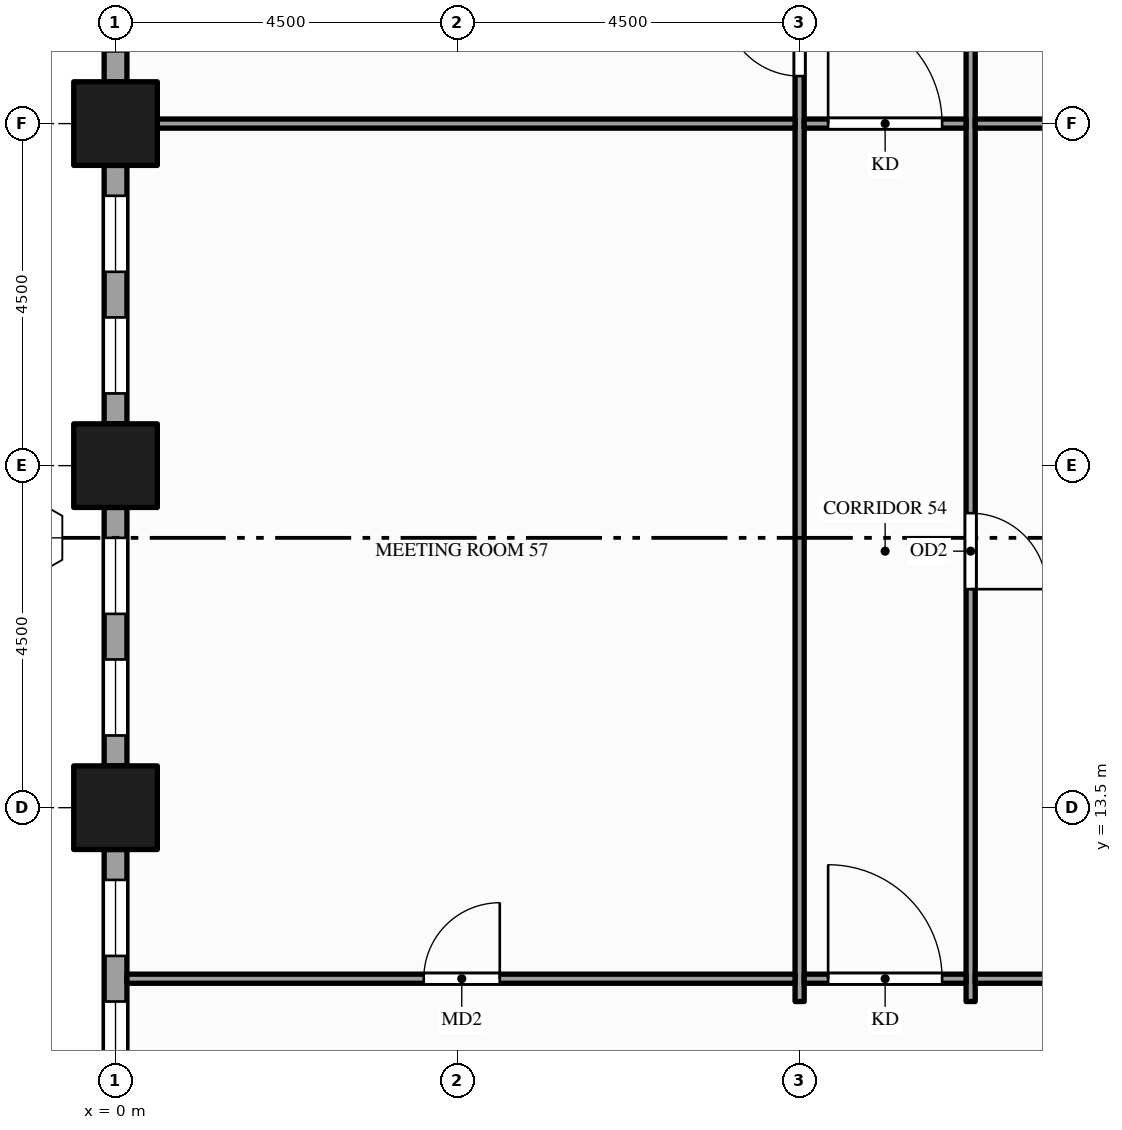
"""IFC4 building model, lengths in metres.
Left out: names, types, materials, properties, quantities, classifications, styles, units other than length and angle.
Written with IfcOpenShell. Run it as: python <this file> out.ifc"""

import sys

from ifc_helpers import new_model, si_unit, direction, frame, frame_2d, origin, origin_2d, place, context, subcontext, project, spatial, rectangle, hollow_rectangle, extrude, element, fill, save


model = new_model("IFC4")
c1 = context("Model", 3, precision=1e-05, world=origin(), true_north=direction((0.0, 1.0)))
c2 = subcontext(c1, "Body", "Model", "MODEL_VIEW")
j1 = project(units=[si_unit("LENGTHUNIT", "METRE"), si_unit("PLANEANGLEUNIT", "RADIAN")], contexts=[c1])
p1 = place(None, origin())
s1 = spatial("IfcSite", under=j1, at=p1, CompositionType="ELEMENT")
p2 = place(p1, origin())
s2 = spatial("IfcBuilding", under=s1, at=p2, CompositionType="ELEMENT")
p3 = place(p2, frame((0.0, 0.0, 14.0)))
s3 = spatial("IfcBuildingStorey", under=s2, at=p3, CompositionType="ELEMENT", Elevation=14.0)
for number, where, z_axis, x_axis in (
    (1, (0.0, 13.5, -0.25), (0.0, 0.0, 1.0), (1.0, 0.0, 0.0)),
    (2, (0.0, 18.0, -0.25), (0.0, 0.0, 1.0), (1.0, 0.0, 0.0)),
    (3, (0.0, 22.5, -0.25), (0.0, 0.0, 1.0), (1.0, 0.0, 0.0)),
):
    element("IfcColumn", number, at=place(p3, frame(where, z_axis=z_axis, x_axis=x_axis)), inside=s3, PredefinedType="COLUMN", context=c2, shape_type="SweptSolid", body=[
        extrude(hollow_rectangle(XDim=1.1, YDim=1.1, WallThickness=0.06, at=origin_2d()), origin(), (0.0, 0.0, 1.0), 5.0),
    ])
p4 = place(p3, frame((0.0, 26.45, 0.0), z_axis=(0.0, 0.0, 1.0), x_axis=(0.0, -1.0, 0.0)))
e4 = element("IfcWall", 4, at=p4, inside=s3, PredefinedType="STANDARD", context=c2, shape_type="SweptSolid", body=[
    extrude(rectangle(XDim=3.4, YDim=0.3, at=frame_2d((1.7, 0.0))), origin(), (0.0, 0.0, 1.0), 4.036),
])
p5 = place(p4, frame((0.4, 0.0, 0.9)))
e5 = element("IfcOpeningElement", 5, at=p5, cuts=e4, PredefinedType="OPENING", context=c2, shape_type="SweptSolid", body=[
    extrude(rectangle(XDim=1.0, YDim=2.75, at=frame_2d((0.5, 1.375))), frame((0.0, 0.16, 0.0), z_axis=(0.0, -1.0, 0.0), x_axis=(1.0, 0.0, 0.0)), (0.0, 0.0, 1.0), 0.32),
])
p6 = place(p4, frame((2.0, 0.0, 0.9)))
e6 = element("IfcOpeningElement", 6, at=p6, cuts=e4, PredefinedType="OPENING", context=c2, shape_type="SweptSolid", body=[
    extrude(rectangle(XDim=1.0, YDim=2.75, at=frame_2d((0.5, 1.375))), frame((0.0, 0.16, 0.0), z_axis=(0.0, -1.0, 0.0), x_axis=(1.0, 0.0, 0.0)), (0.0, 0.0, 1.0), 0.32),
])
p7 = place(p3, frame((0.0, 21.95, 0.0), z_axis=(0.0, 0.0, 1.0), x_axis=(0.0, -1.0, 0.0)))
e7 = element("IfcWall", 7, at=p7, inside=s3, PredefinedType="STANDARD", context=c2, shape_type="SweptSolid", body=[
    extrude(rectangle(XDim=3.4, YDim=0.3, at=frame_2d((1.7, 0.0))), origin(), (0.0, 0.0, 1.0), 4.036),
])
p8 = place(p7, frame((0.4, 0.0, 0.9)))
e8 = element("IfcOpeningElement", 8, at=p8, cuts=e7, PredefinedType="OPENING", context=c2, shape_type="SweptSolid", body=[
    extrude(rectangle(XDim=1.0, YDim=2.75, at=frame_2d((0.5, 1.375))), frame((0.0, 0.16, 0.0), z_axis=(0.0, -1.0, 0.0), x_axis=(1.0, 0.0, 0.0)), (0.0, 0.0, 1.0), 0.32),
])
p9 = place(p7, frame((2.0, 0.0, 0.9)))
e9 = element("IfcOpeningElement", 9, at=p9, cuts=e7, PredefinedType="OPENING", context=c2, shape_type="SweptSolid", body=[
    extrude(rectangle(XDim=1.0, YDim=2.75, at=frame_2d((0.5, 1.375))), frame((0.0, 0.16, 0.0), z_axis=(0.0, -1.0, 0.0), x_axis=(1.0, 0.0, 0.0)), (0.0, 0.0, 1.0), 0.32),
])
p10 = place(p3, frame((0.0, 17.45, 0.0), z_axis=(0.0, 0.0, 1.0), x_axis=(0.0, -1.0, 0.0)))
e10 = element("IfcWall", 10, at=p10, inside=s3, PredefinedType="STANDARD", context=c2, shape_type="SweptSolid", body=[
    extrude(rectangle(XDim=3.4, YDim=0.3, at=frame_2d((1.7, 0.0))), origin(), (0.0, 0.0, 1.0), 4.036),
])
p11 = place(p10, frame((0.4, 0.0, 0.9)))
e11 = element("IfcOpeningElement", 11, at=p11, cuts=e10, PredefinedType="OPENING", context=c2, shape_type="SweptSolid", body=[
    extrude(rectangle(XDim=1.0, YDim=2.75, at=frame_2d((0.5, 1.375))), frame((0.0, 0.16, 0.0), z_axis=(0.0, -1.0, 0.0), x_axis=(1.0, 0.0, 0.0)), (0.0, 0.0, 1.0), 0.32),
])
p12 = place(p10, frame((2.0, 0.0, 0.9)))
e12 = element("IfcOpeningElement", 12, at=p12, cuts=e10, PredefinedType="OPENING", context=c2, shape_type="SweptSolid", body=[
    extrude(rectangle(XDim=1.0, YDim=2.75, at=frame_2d((0.5, 1.375))), frame((0.0, 0.16, 0.0), z_axis=(0.0, -1.0, 0.0), x_axis=(1.0, 0.0, 0.0)), (0.0, 0.0, 1.0), 0.32),
])
p13 = place(p3, frame((0.0, 12.95, 0.0), z_axis=(0.0, 0.0, 1.0), x_axis=(0.0, -1.0, 0.0)))
e13 = element("IfcWall", 13, at=p13, inside=s3, PredefinedType="STANDARD", context=c2, shape_type="SweptSolid", body=[
    extrude(rectangle(XDim=3.4, YDim=0.3, at=frame_2d((1.7, 0.0))), origin(), (0.0, 0.0, 1.0), 4.036),
])
p14 = place(p13, frame((0.4, 0.0, 0.9)))
e14 = element("IfcOpeningElement", 14, at=p14, cuts=e13, PredefinedType="OPENING", context=c2, shape_type="SweptSolid", body=[
    extrude(rectangle(XDim=1.0, YDim=2.75, at=frame_2d((0.5, 1.375))), frame((0.0, 0.16, 0.0), z_axis=(0.0, -1.0, 0.0), x_axis=(1.0, 0.0, 0.0)), (0.0, 0.0, 1.0), 0.32),
])
p15 = place(p13, frame((2.0, 0.0, 0.9)))
e15 = element("IfcOpeningElement", 15, at=p15, cuts=e13, PredefinedType="OPENING", context=c2, shape_type="SweptSolid", body=[
    extrude(rectangle(XDim=1.0, YDim=2.75, at=frame_2d((0.5, 1.375))), frame((0.0, 0.16, 0.0), z_axis=(0.0, -1.0, 0.0), x_axis=(1.0, 0.0, 0.0)), (0.0, 0.0, 1.0), 0.32),
])
p16 = place(p3, frame((9.0, 10.95, 0.0), z_axis=(0.0, 0.0, 1.0), x_axis=(0.0, 1.0, 0.0)))
e16 = element("IfcWall", 16, at=p16, inside=s3, PredefinedType="PARTITIONING", context=c2, shape_type="SweptSolid", body=[
    extrude(rectangle(XDim=20.85, YDim=0.12, at=frame_2d((10.425, 0.0))), origin(), (0.0, 0.0, 1.0), 3.5),
])
p17 = place(p16, frame((12.175, 0.0, 0.0)))
e17 = element("IfcOpeningElement", 17, at=p17, cuts=e16, PredefinedType="OPENING", context=c2, shape_type="SweptSolid", body=[
    extrude(rectangle(XDim=1.0, YDim=2.1, at=frame_2d((0.5, 1.05))), frame((0.0, 0.07, 0.0), z_axis=(0.0, -1.0, 0.0), x_axis=(1.0, 0.0, 0.0)), (0.0, 0.0, 1.0), 0.14),
])
p18 = place(p16, frame((14.425, 0.0, 0.0)))
e18 = element("IfcOpeningElement", 18, at=p18, cuts=e16, PredefinedType="OPENING", context=c2, shape_type="SweptSolid", body=[
    extrude(rectangle(XDim=1.0, YDim=2.1, at=frame_2d((0.5, 1.05))), frame((0.0, 0.07, 0.0), z_axis=(0.0, -1.0, 0.0), x_axis=(1.0, 0.0, 0.0)), (0.0, 0.0, 1.0), 0.14),
])
p19 = place(p16, frame((16.675, 0.0, 0.0)))
e19 = element("IfcOpeningElement", 19, at=p19, cuts=e16, PredefinedType="OPENING", context=c2, shape_type="SweptSolid", body=[
    extrude(rectangle(XDim=1.0, YDim=2.1, at=frame_2d((0.5, 1.05))), frame((0.0, 0.07, 0.0), z_axis=(0.0, -1.0, 0.0), x_axis=(1.0, 0.0, 0.0)), (0.0, 0.0, 1.0), 0.14),
])
p20 = place(p16, frame((18.925, 0.0, 0.0)))
e20 = element("IfcOpeningElement", 20, at=p20, cuts=e16, PredefinedType="OPENING", context=c2, shape_type="SweptSolid", body=[
    extrude(rectangle(XDim=1.0, YDim=2.1, at=frame_2d((0.5, 1.05))), frame((0.0, 0.07, 0.0), z_axis=(0.0, -1.0, 0.0), x_axis=(1.0, 0.0, 0.0)), (0.0, 0.0, 1.0), 0.14),
])
p21 = place(p3, frame((11.25, 10.95, 0.0), z_axis=(0.0, 0.0, 1.0), x_axis=(0.0, 1.0, 0.0)))
e21 = element("IfcWall", 21, at=p21, inside=s3, PredefinedType="PARTITIONING", context=c2, shape_type="SweptSolid", body=[
    extrude(rectangle(XDim=20.85, YDim=0.12, at=frame_2d((10.425, 0.0))), origin(), (0.0, 0.0, 1.0), 3.5),
])
p22 = place(p21, frame((5.425, 0.0, 0.0)))
e22 = element("IfcOpeningElement", 22, at=p22, cuts=e21, PredefinedType="OPENING", context=c2, shape_type="SweptSolid", body=[
    extrude(rectangle(XDim=1.0, YDim=2.1, at=frame_2d((0.5, 1.05))), frame((0.0, 0.07, 0.0), z_axis=(0.0, -1.0, 0.0), x_axis=(1.0, 0.0, 0.0)), (0.0, 0.0, 1.0), 0.14),
])
p23 = place(p21, frame((14.425, 0.0, 0.0)))
e23 = element("IfcOpeningElement", 23, at=p23, cuts=e21, PredefinedType="OPENING", context=c2, shape_type="SweptSolid", body=[
    extrude(rectangle(XDim=1.0, YDim=2.1, at=frame_2d((0.5, 1.05))), frame((0.0, 0.07, 0.0), z_axis=(0.0, -1.0, 0.0), x_axis=(1.0, 0.0, 0.0)), (0.0, 0.0, 1.0), 0.14),
])
p24 = place(p21, frame((18.925, 0.0, 0.0)))
e24 = element("IfcOpeningElement", 24, at=p24, cuts=e21, PredefinedType="OPENING", context=c2, shape_type="SweptSolid", body=[
    extrude(rectangle(XDim=1.0, YDim=2.1, at=frame_2d((0.5, 1.05))), frame((0.0, 0.07, 0.0), z_axis=(0.0, -1.0, 0.0), x_axis=(1.0, 0.0, 0.0)), (0.0, 0.0, 1.0), 0.14),
])
p25 = place(p3, frame((0.15, 11.25, 0.0), z_axis=(0.0, 0.0, 1.0), x_axis=(1.0, 0.0, 0.0)))
e25 = element("IfcWall", 25, at=p25, inside=s3, PredefinedType="PARTITIONING", context=c2, shape_type="SweptSolid", body=[
    extrude(rectangle(XDim=8.79, YDim=0.12, at=frame_2d((4.395, 0.0))), origin(), (0.0, 0.0, 1.0), 3.759),
])
p26 = place(p25, frame((3.905, 0.0, 0.0)))
e26 = element("IfcOpeningElement", 26, at=p26, cuts=e25, PredefinedType="OPENING", context=c2, shape_type="SweptSolid", body=[
    extrude(rectangle(XDim=1.0, YDim=2.1, at=frame_2d((0.5, 1.05))), frame((0.0, 0.07, 0.0), z_axis=(0.0, -1.0, 0.0), x_axis=(1.0, 0.0, 0.0)), (0.0, 0.0, 1.0), 0.14),
])
p27 = place(p3, frame((9.06, 11.25, 0.0), z_axis=(0.0, 0.0, 1.0), x_axis=(1.0, 0.0, 0.0)))
e27 = element("IfcWall", 27, at=p27, inside=s3, PredefinedType="PARTITIONING", context=c2, shape_type="SweptSolid", body=[
    extrude(rectangle(XDim=2.13, YDim=0.12, at=frame_2d((1.065, 0.0))), origin(), (0.0, 0.0, 1.0), 3.759),
])
p28 = place(p27, frame((0.315, 0.0, 0.0)))
e28 = element("IfcOpeningElement", 28, at=p28, cuts=e27, PredefinedType="OPENING", context=c2, shape_type="SweptSolid", body=[
    extrude(rectangle(XDim=1.5, YDim=2.1, at=frame_2d((0.75, 1.05))), frame((0.0, 0.07, 0.0), z_axis=(0.0, -1.0, 0.0), x_axis=(1.0, 0.0, 0.0)), (0.0, 0.0, 1.0), 0.14),
])
p29 = place(p3, frame((11.31, 11.25, 0.0), z_axis=(0.0, 0.0, 1.0), x_axis=(1.0, 0.0, 0.0)))
e29 = element("IfcWall", 29, at=p29, inside=s3, PredefinedType="PARTITIONING", context=c2, shape_type="SweptSolid", body=[
    extrude(rectangle(XDim=11.13, YDim=0.12, at=frame_2d((5.565, 0.0))), origin(), (0.0, 0.0, 1.0), 3.759),
])
p30 = place(p3, frame((0.15, 22.5, 0.0), z_axis=(0.0, 0.0, 1.0), x_axis=(1.0, 0.0, 0.0)))
e30 = element("IfcWall", 30, at=p30, inside=s3, PredefinedType="PARTITIONING", context=c2, shape_type="SweptSolid", body=[
    extrude(rectangle(XDim=8.79, YDim=0.12, at=frame_2d((4.395, 0.0))), origin(), (0.0, 0.0, 1.0), 3.5),
])
p31 = place(p3, frame((9.06, 22.5, 0.0), z_axis=(0.0, 0.0, 1.0), x_axis=(1.0, 0.0, 0.0)))
e31 = element("IfcWall", 31, at=p31, inside=s3, PredefinedType="PARTITIONING", context=c2, shape_type="SweptSolid", body=[
    extrude(rectangle(XDim=2.13, YDim=0.12, at=frame_2d((1.065, 0.0))), origin(), (0.0, 0.0, 1.0), 3.5),
])
p32 = place(p31, frame((0.315, 0.0, 0.0)))
e32 = element("IfcOpeningElement", 32, at=p32, cuts=e31, PredefinedType="OPENING", context=c2, shape_type="SweptSolid", body=[
    extrude(rectangle(XDim=1.5, YDim=2.1, at=frame_2d((0.75, 1.05))), frame((0.0, 0.07, 0.0), z_axis=(0.0, -1.0, 0.0), x_axis=(1.0, 0.0, 0.0)), (0.0, 0.0, 1.0), 0.14),
])
p33 = place(p3, frame((11.31, 22.5, 0.0), z_axis=(0.0, 0.0, 1.0), x_axis=(1.0, 0.0, 0.0)))
e33 = element("IfcWall", 33, at=p33, inside=s3, PredefinedType="PARTITIONING", context=c2, shape_type="SweptSolid", body=[
    extrude(rectangle(XDim=11.13, YDim=0.12, at=frame_2d((5.565, 0.0))), origin(), (0.0, 0.0, 1.0), 3.5),
])
p34 = place(p8, origin())
e34 = element("IfcWindow", 34, at=p34, inside=s3, PartitioningType="SINGLE_PANEL", PredefinedType="WINDOW", context=c2, shape_type="SweptSolid", body=[
    extrude(rectangle(XDim=1.0, YDim=2.75, at=frame_2d((0.5, 1.375))), frame((0.0, 0.03, 0.0), z_axis=(0.0, -1.0, 0.0), x_axis=(1.0, 0.0, 0.0)), (0.0, 0.0, 1.0), 0.06),
])
fill(e8, e34)
p35 = place(p9, origin())
e35 = element("IfcWindow", 35, at=p35, inside=s3, PartitioningType="SINGLE_PANEL", PredefinedType="WINDOW", context=c2, shape_type="SweptSolid", body=[
    extrude(rectangle(XDim=1.0, YDim=2.75, at=frame_2d((0.5, 1.375))), frame((0.0, 0.03, 0.0), z_axis=(0.0, -1.0, 0.0), x_axis=(1.0, 0.0, 0.0)), (0.0, 0.0, 1.0), 0.06),
])
fill(e9, e35)
p36 = place(p11, origin())
e36 = element("IfcWindow", 36, at=p36, inside=s3, PartitioningType="SINGLE_PANEL", PredefinedType="WINDOW", context=c2, shape_type="SweptSolid", body=[
    extrude(rectangle(XDim=1.0, YDim=2.75, at=frame_2d((0.5, 1.375))), frame((0.0, 0.03, 0.0), z_axis=(0.0, -1.0, 0.0), x_axis=(1.0, 0.0, 0.0)), (0.0, 0.0, 1.0), 0.06),
])
fill(e11, e36)
p37 = place(p12, origin())
e37 = element("IfcWindow", 37, at=p37, inside=s3, PartitioningType="SINGLE_PANEL", PredefinedType="WINDOW", context=c2, shape_type="SweptSolid", body=[
    extrude(rectangle(XDim=1.0, YDim=2.75, at=frame_2d((0.5, 1.375))), frame((0.0, 0.03, 0.0), z_axis=(0.0, -1.0, 0.0), x_axis=(1.0, 0.0, 0.0)), (0.0, 0.0, 1.0), 0.06),
])
fill(e12, e37)
p38 = place(p14, origin())
e38 = element("IfcWindow", 38, at=p38, inside=s3, PartitioningType="SINGLE_PANEL", PredefinedType="WINDOW", context=c2, shape_type="SweptSolid", body=[
    extrude(rectangle(XDim=1.0, YDim=2.75, at=frame_2d((0.5, 1.375))), frame((0.0, 0.03, 0.0), z_axis=(0.0, -1.0, 0.0), x_axis=(1.0, 0.0, 0.0)), (0.0, 0.0, 1.0), 0.06),
])
fill(e14, e38)
p39 = place(p15, origin())
e39 = element("IfcWindow", 39, at=p39, inside=s3, PartitioningType="SINGLE_PANEL", PredefinedType="WINDOW", context=c2, shape_type="SweptSolid", body=[
    extrude(rectangle(XDim=1.0, YDim=2.75, at=frame_2d((0.5, 1.375))), frame((0.0, 0.03, 0.0), z_axis=(0.0, -1.0, 0.0), x_axis=(1.0, 0.0, 0.0)), (0.0, 0.0, 1.0), 0.06),
])
fill(e15, e39)
p40 = place(p28, origin())
e40 = element("IfcDoor", 40, at=p40, inside=s3, OperationType="SINGLE_SWING_LEFT", PredefinedType="DOOR", context=c2, shape_type="SweptSolid", body=[
    extrude(rectangle(XDim=1.5, YDim=2.1, at=frame_2d((0.75, 1.05))), frame((0.0, 0.025, 0.0), z_axis=(0.0, -1.0, 0.0), x_axis=(1.0, 0.0, 0.0)), (0.0, 0.0, 1.0), 0.05),
])
fill(e28, e40)
p41 = place(p26, origin())
e41 = element("IfcDoor", 41, at=p41, inside=s3, OperationType="SINGLE_SWING_RIGHT", PredefinedType="DOOR", context=c2, shape_type="SweptSolid", body=[
    extrude(rectangle(XDim=1.0, YDim=2.1, at=frame_2d((0.5, 1.05))), frame((0.0, 0.025, 0.0), z_axis=(0.0, -1.0, 0.0), x_axis=(1.0, 0.0, 0.0)), (0.0, 0.0, 1.0), 0.05),
])
fill(e26, e41)
p42 = place(p22, origin())
e42 = element("IfcDoor", 42, at=p42, inside=s3, OperationType="SINGLE_SWING_LEFT", PredefinedType="DOOR", context=c2, shape_type="SweptSolid", body=[
    extrude(rectangle(XDim=1.0, YDim=2.1, at=frame_2d((0.5, 1.05))), frame((0.0, 0.025, 0.0), z_axis=(0.0, -1.0, 0.0), x_axis=(1.0, 0.0, 0.0)), (0.0, 0.0, 1.0), 0.05),
])
fill(e22, e42)
p43 = place(p32, origin())
e43 = element("IfcDoor", 43, at=p43, inside=s3, OperationType="SINGLE_SWING_LEFT", PredefinedType="DOOR", context=c2, shape_type="SweptSolid", body=[
    extrude(rectangle(XDim=1.5, YDim=2.1, at=frame_2d((0.75, 1.05))), frame((0.0, 0.025, 0.0), z_axis=(0.0, -1.0, 0.0), x_axis=(1.0, 0.0, 0.0)), (0.0, 0.0, 1.0), 0.05),
])
fill(e32, e43)
p44 = place(p17, origin())
e44 = element("IfcDoor", 44, at=p44, inside=s3, OperationType="SINGLE_SWING_RIGHT", PredefinedType="DOOR", context=c2, shape_type="SweptSolid", body=[
    extrude(rectangle(XDim=1.0, YDim=2.1, at=frame_2d((0.5, 1.05))), frame((0.0, 0.025, 0.0), z_axis=(0.0, -1.0, 0.0), x_axis=(1.0, 0.0, 0.0)), (0.0, 0.0, 1.0), 0.05),
])
fill(e17, e44)
save(model, sys.argv[1])
